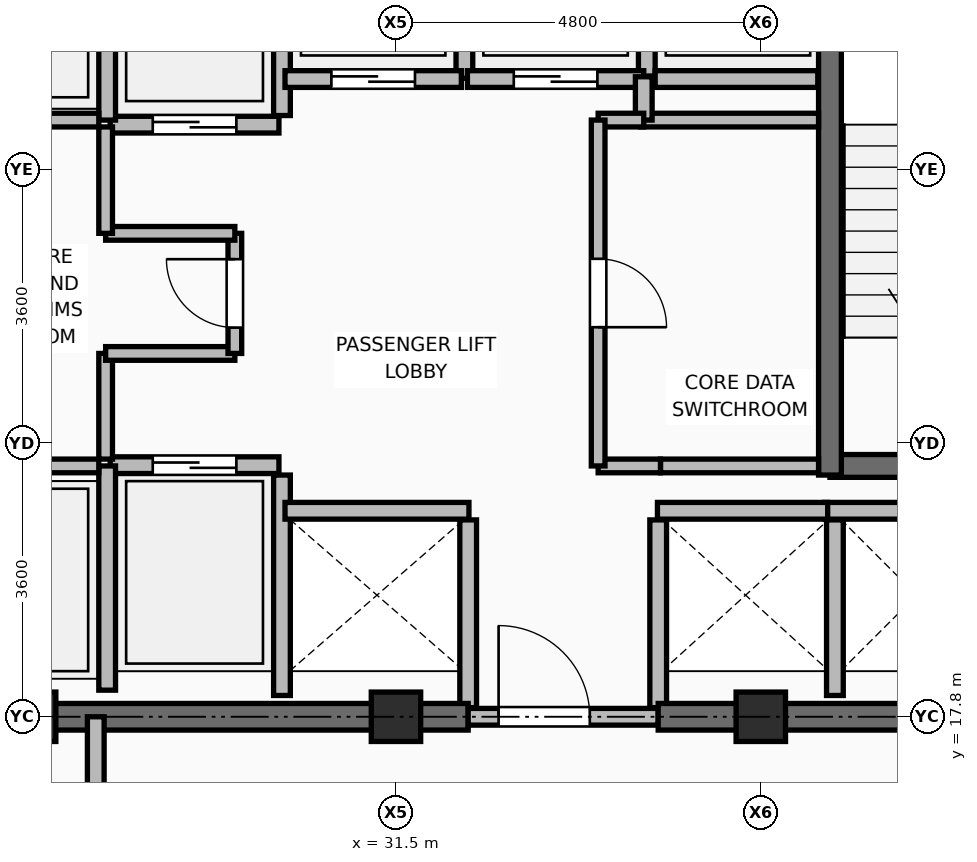
"""IFC4 building model, lengths in metres.
Left out: names, types, materials, properties, quantities, classifications, styles, units other than length and angle.
Written with IfcOpenShell. Run it as: python <this file> out.ifc"""

import sys

from ifc_helpers import new_model, si_unit, direction, frame, frame_2d, origin, origin_2d, place, context, subcontext, project, spatial, rectangle, extrude, element, fill, save


model = new_model("IFC4")
c1 = context("Model", 3, precision=1e-05, world=origin(), true_north=direction((0.0, 1.0)))
c2 = subcontext(c1, "Body", "Model", "MODEL_VIEW")
j1 = project(units=[si_unit("LENGTHUNIT", "METRE"), si_unit("PLANEANGLEUNIT", "RADIAN")], contexts=[c1])
p1 = place(None, origin())
s1 = spatial("IfcSite", under=j1, at=p1, CompositionType="ELEMENT")
p2 = place(p1, origin())
s2 = spatial("IfcBuilding", under=s1, at=p2, CompositionType="ELEMENT")
p3 = place(p2, frame((0.0, 0.0, 271.35)))
s3 = spatial("IfcBuildingStorey", under=s2, at=p3, CompositionType="ELEMENT", Elevation=271.35)
for number, where, z_axis, x_axis in (
    (1, (26.7, 17.8, 0.0), (0.0, 0.0, 1.0), (1.0, 0.0, 0.0)),
    (2, (31.5, 17.8, 0.0), (0.0, 0.0, 1.0), (1.0, 0.0, 0.0)),
    (3, (36.3, 17.8, 0.0), (0.0, 0.0, 1.0), (1.0, 0.0, 0.0)),
):
    element("IfcColumn", number, at=place(p3, frame(where, z_axis=z_axis, x_axis=x_axis)), inside=s3, PredefinedType="COLUMN", context=c2, shape_type="SweptSolid", body=[
        extrude(rectangle(XDim=0.65, YDim=0.65, at=origin_2d()), origin(), (0.0, 0.0, 1.0), 3.75),
    ])
p4 = place(p3, frame((30.0, 18.08, 0.0), z_axis=(0.0, 0.0, 1.0), x_axis=(0.0, 1.0, 0.0)))
e4 = element("IfcWall", 4, at=p4, inside=s3, PredefinedType="PARTITIONING", context=c2, shape_type="SweptSolid", body=[
    extrude(rectangle(XDim=2.9, YDim=0.22, at=frame_2d((1.45, 0.0))), origin(), (0.0, 0.0, 1.0), 3.545),
])
for number, where, z_axis, x_axis in (
    (5, (32.45, 17.92, 0.0), (0.0, 0.0, 1.0), (0.0, 1.0, 0.0)),
    (6, (34.95, 17.92, 0.0), (0.0, 0.0, 1.0), (0.0, 1.0, 0.0)),
):
    element("IfcWall", number, at=place(p3, frame(where, z_axis=z_axis, x_axis=x_axis)), inside=s3, PredefinedType="PARTITIONING", context=c2, shape_type="SweptSolid", body=[
        extrude(rectangle(XDim=2.47, YDim=0.22, at=frame_2d((1.235, 0.0))), origin(), (0.0, 0.0, 1.0), 3.545),
    ])
p5 = place(p3, frame((37.275, 18.08, 0.0), z_axis=(0.0, 0.0, 1.0), x_axis=(0.0, 1.0, 0.0)))
e7 = element("IfcWall", 7, at=p5, inside=s3, PredefinedType="PARTITIONING", context=c2, shape_type="SweptSolid", body=[
    extrude(rectangle(XDim=2.31, YDim=0.22, at=frame_2d((1.155, 0.0))), origin(), (0.0, 0.0, 1.0), 3.545),
])
p6 = place(p3, frame((30.0, 25.71, 0.0), z_axis=(0.0, 0.0, 1.0), x_axis=(0.0, 1.0, 0.0)))
e8 = element("IfcWall", 8, at=p6, inside=s3, PredefinedType="PARTITIONING", context=c2, shape_type="SweptSolid", body=[
    extrude(rectangle(XDim=2.73, YDim=0.22, at=frame_2d((1.365, 0.0))), origin(), (0.0, 0.0, 1.0), 3.545),
])
p7 = place(p3, frame((32.4, 26.2, 0.0), z_axis=(0.0, 0.0, 1.0), x_axis=(0.0, 1.0, 0.0)))
e9 = element("IfcWall", 9, at=p7, inside=s3, PredefinedType="PARTITIONING", context=c2, shape_type="SweptSolid", body=[
    extrude(rectangle(XDim=2.24, YDim=0.22, at=frame_2d((1.12, 0.0))), origin(), (0.0, 0.0, 1.0), 3.545),
])
p8 = place(p3, frame((34.8, 26.23, 0.0), z_axis=(0.0, 0.0, 1.0), x_axis=(0.0, 1.0, 0.0)))
e10 = element("IfcWall", 10, at=p8, inside=s3, PredefinedType="PARTITIONING", context=c2, shape_type="SweptSolid", body=[
    extrude(rectangle(XDim=2.21, YDim=0.22, at=frame_2d((1.105, 0.0))), origin(), (0.0, 0.0, 1.0), 3.545),
])
p9 = place(p3, frame((34.91, 26.19, 0.0), z_axis=(0.0, 0.0, 1.0), x_axis=(1.0, 0.0, 0.0)))
e11 = element("IfcWall", 11, at=p9, inside=s3, PredefinedType="PARTITIONING", context=c2, shape_type="SweptSolid", body=[
    extrude(rectangle(XDim=2.14, YDim=0.22, at=frame_2d((1.07, 0.0))), origin(), (0.0, 0.0, 1.0), 3.545),
])
p10 = place(p3, frame((25.55, 17.8, 0.0), z_axis=(0.0, 0.0, 1.0), x_axis=(1.0, 0.0, 0.0)))
e12 = element("IfcWall", 12, at=p10, inside=s3, PredefinedType="SHEAR", context=c2, shape_type="SweptSolid", body=[
    extrude(rectangle(XDim=6.9, YDim=0.35, at=frame_2d((3.45, 0.0))), origin(), (0.0, 0.0, 1.0), 3.57),
])
p11 = place(p3, frame((32.45, 17.8, 0.0), z_axis=(0.0, 0.0, 1.0), x_axis=(1.0, 0.0, 0.0)))
e13 = element("IfcWall", 13, at=p11, inside=s3, PredefinedType="PARTITIONING", context=c2, shape_type="SweptSolid", body=[
    extrude(rectangle(XDim=2.5, YDim=0.22, at=frame_2d((1.25, 0.0))), origin(), (0.0, 0.0, 1.0), 3.132),
])
p12 = place(p11, frame((0.4, 0.0, 0.0)))
e14 = element("IfcOpeningElement", 14, at=p12, cuts=e13, PredefinedType="OPENING", context=c2, shape_type="SweptSolid", body=[
    extrude(rectangle(XDim=1.2, YDim=2.1, at=frame_2d((0.6, 1.05))), frame((0.0, 0.12, 0.0), z_axis=(0.0, -1.0, 0.0), x_axis=(1.0, 0.0, 0.0)), (0.0, 0.0, 1.0), 0.24),
])
p13 = place(p3, frame((34.95, 17.8, 0.0), z_axis=(0.0, 0.0, 1.0), x_axis=(1.0, 0.0, 0.0)))
e15 = element("IfcWall", 15, at=p13, inside=s3, PredefinedType="SHEAR", context=c2, shape_type="SweptSolid", body=[
    extrude(rectangle(XDim=6.325, YDim=0.35, at=frame_2d((3.163, 0.0))), origin(), (0.0, 0.0, 1.0), 3.57),
])
p14 = place(p3, frame((37.21, 21.1, 0.0), z_axis=(0.0, 0.0, 1.0), x_axis=(1.0, 0.0, 0.0)))
e16 = element("IfcWall", 16, at=p14, inside=s3, PredefinedType="SHEAR", context=c2, shape_type="SweptSolid", body=[
    extrude(rectangle(XDim=3.715, YDim=0.3, at=frame_2d((1.857, 0.0))), origin(), (0.0, 0.0, 1.0), 3.57),
])
p15 = place(p3, frame((37.21, 20.98, 0.0), z_axis=(0.0, 0.0, 1.0), x_axis=(0.0, 1.0, 0.0)))
e17 = element("IfcWall", 17, at=p15, inside=s3, PredefinedType="SHEAR", context=c2, shape_type="SweptSolid", body=[
    extrude(rectangle(XDim=7.99, YDim=0.3, at=frame_2d((3.995, 0.0))), origin(), (0.0, 0.0, 1.0), 3.57),
])
p16 = place(p3, frame((27.74, 21.11, 0.0), z_axis=(0.0, 0.0, 1.0), x_axis=(1.0, 0.0, 0.0)))
e18 = element("IfcWall", 18, at=p16, inside=s3, PredefinedType="PARTITIONING", context=c2, shape_type="SweptSolid", body=[
    extrude(rectangle(XDim=2.22, YDim=0.22, at=frame_2d((1.11, 0.0))), origin(), (0.0, 0.0, 1.0), 3.55),
])
p17 = place(p16, frame((0.56, 0.0, 0.0)))
e19 = element("IfcOpeningElement", 19, at=p17, cuts=e18, PredefinedType="OPENING", context=c2, shape_type="SweptSolid", body=[
    extrude(rectangle(XDim=1.1, YDim=2.2, at=frame_2d((0.55, 1.1))), frame((0.0, 0.12, 0.0), z_axis=(0.0, -1.0, 0.0), x_axis=(1.0, 0.0, 0.0)), (0.0, 0.0, 1.0), 0.24),
])
p18 = place(p3, frame((27.74, 25.59, 0.0), z_axis=(0.0, 0.0, 1.0), x_axis=(1.0, 0.0, 0.0)))
e20 = element("IfcWall", 20, at=p18, inside=s3, PredefinedType="PARTITIONING", context=c2, shape_type="SweptSolid", body=[
    extrude(rectangle(XDim=2.22, YDim=0.22, at=frame_2d((1.11, 0.0))), origin(), (0.0, 0.0, 1.0), 3.55),
])
p19 = place(p18, frame((0.56, 0.0, 0.0)))
e21 = element("IfcOpeningElement", 21, at=p19, cuts=e20, PredefinedType="OPENING", context=c2, shape_type="SweptSolid", body=[
    extrude(rectangle(XDim=1.1, YDim=2.2, at=frame_2d((0.55, 1.1))), frame((0.0, 0.12, 0.0), z_axis=(0.0, -1.0, 0.0), x_axis=(1.0, 0.0, 0.0)), (0.0, 0.0, 1.0), 0.24),
])
p20 = place(p3, frame((30.04, 20.51, 0.0), z_axis=(0.0, 0.0, 1.0), x_axis=(1.0, 0.0, 0.0)))
e22 = element("IfcWall", 22, at=p20, inside=s3, PredefinedType="PARTITIONING", context=c2, shape_type="SweptSolid", body=[
    extrude(rectangle(XDim=2.42, YDim=0.22, at=frame_2d((1.21, 0.0))), origin(), (0.0, 0.0, 1.0), 3.55),
])
for number, where, z_axis, x_axis in (
    (23, (37.14, 20.51, 0.0), (0.0, 0.0, 1.0), (1.0, 0.0, 0.0)),
    (24, (34.94, 20.51, 0.0), (0.0, 0.0, 1.0), (1.0, 0.0, 0.0)),
):
    element("IfcWall", number, at=place(p3, frame(where, z_axis=z_axis, x_axis=x_axis)), inside=s3, PredefinedType="PARTITIONING", context=c2, shape_type="SweptSolid", body=[
        extrude(rectangle(XDim=2.24, YDim=0.22, at=frame_2d((1.12, 0.0))), origin(), (0.0, 0.0, 1.0), 3.55),
    ])
p21 = place(p3, frame((30.04, 26.19, 0.0), z_axis=(0.0, 0.0, 1.0), x_axis=(1.0, 0.0, 0.0)))
e25 = element("IfcWall", 25, at=p21, inside=s3, PredefinedType="PARTITIONING", context=c2, shape_type="SweptSolid", body=[
    extrude(rectangle(XDim=2.32, YDim=0.22, at=frame_2d((1.16, 0.0))), origin(), (0.0, 0.0, 1.0), 3.55),
])
p22 = place(p21, frame((0.61, 0.0, 0.0)))
e26 = element("IfcOpeningElement", 26, at=p22, cuts=e25, PredefinedType="OPENING", context=c2, shape_type="SweptSolid", body=[
    extrude(rectangle(XDim=1.1, YDim=2.2, at=frame_2d((0.55, 1.1))), frame((0.0, 0.12, 0.0), z_axis=(0.0, -1.0, 0.0), x_axis=(1.0, 0.0, 0.0)), (0.0, 0.0, 1.0), 0.24),
])
p23 = place(p3, frame((32.44, 26.19, 0.0), z_axis=(0.0, 0.0, 1.0), x_axis=(1.0, 0.0, 0.0)))
e27 = element("IfcWall", 27, at=p23, inside=s3, PredefinedType="PARTITIONING", context=c2, shape_type="SweptSolid", body=[
    extrude(rectangle(XDim=2.32, YDim=0.22, at=frame_2d((1.16, 0.0))), origin(), (0.0, 0.0, 1.0), 3.55),
])
p24 = place(p23, frame((0.61, 0.0, 0.0)))
e28 = element("IfcOpeningElement", 28, at=p24, cuts=e27, PredefinedType="OPENING", context=c2, shape_type="SweptSolid", body=[
    extrude(rectangle(XDim=1.1, YDim=2.2, at=frame_2d((0.55, 1.1))), frame((0.0, 0.12, 0.0), z_axis=(0.0, -1.0, 0.0), x_axis=(1.0, 0.0, 0.0)), (0.0, 0.0, 1.0), 0.24),
])
p25 = place(p3, frame((27.7, 18.15, 0.0), z_axis=(0.0, 0.0, 1.0), x_axis=(0.0, 1.0, 0.0)))
e29 = element("IfcWall", 29, at=p25, inside=s3, PredefinedType="PARTITIONING", context=c2, shape_type="SweptSolid", body=[
    extrude(rectangle(XDim=2.95, YDim=0.22, at=frame_2d((1.475, 0.0))), origin(), (0.0, 0.0, 1.0), 3.55),
])
p26 = place(p3, frame((27.7, 25.65, 0.0), z_axis=(0.0, 0.0, 1.0), x_axis=(0.0, 1.0, 0.0)))
e30 = element("IfcWall", 30, at=p26, inside=s3, PredefinedType="PARTITIONING", context=c2, shape_type="SweptSolid", body=[
    extrude(rectangle(XDim=3.0, YDim=0.22, at=frame_2d((1.5, 0.0))), origin(), (0.0, 0.0, 1.0), 3.55),
])
for number, where, z_axis, x_axis in (
    (31, (25.89, 21.1, 0.0), (0.0, 0.0, 1.0), (1.0, 0.0, 0.0)),
    (32, (25.89, 25.65, 0.0), (0.0, 0.0, 1.0), (1.0, 0.0, 0.0)),
):
    element("IfcWall", number, at=place(p3, frame(where, z_axis=z_axis, x_axis=x_axis)), inside=s3, PredefinedType="PARTITIONING", context=c2, shape_type="SweptSolid", body=[
        extrude(rectangle(XDim=1.7, YDim=0.18, at=frame_2d((0.85, 0.0))), origin(), (0.0, 0.0, 1.0), 3.55),
    ])
p27 = place(p3, frame((27.68, 21.19, 0.0), z_axis=(0.0, 0.0, 1.0), x_axis=(0.0, 1.0, 0.0)))
e33 = element("IfcWall", 33, at=p27, inside=s3, PredefinedType="PARTITIONING", context=c2, shape_type="SweptSolid", body=[
    extrude(rectangle(XDim=1.39, YDim=0.18, at=frame_2d((0.695, 0.0))), origin(), (0.0, 0.0, 1.0), 3.55),
])
p28 = place(p3, frame((27.68, 22.58, 0.0), z_axis=(0.0, 0.0, 1.0), x_axis=(1.0, 0.0, 0.0)))
e34 = element("IfcWall", 34, at=p28, inside=s3, PredefinedType="PARTITIONING", context=c2, shape_type="SweptSolid", body=[
    extrude(rectangle(XDim=1.7, YDim=0.18, at=frame_2d((0.85, 0.0))), origin(), (0.0, 0.0, 1.0), 3.55),
])
p29 = place(p3, frame((29.38, 22.58, 0.0), z_axis=(0.0, 0.0, 1.0), x_axis=(0.0, 1.0, 0.0)))
e35 = element("IfcWall", 35, at=p29, inside=s3, PredefinedType="PARTITIONING", context=c2, shape_type="SweptSolid", body=[
    extrude(rectangle(XDim=1.58, YDim=0.18, at=frame_2d((0.79, 0.0))), origin(), (0.0, 0.0, 1.0), 3.55),
])
p30 = place(p29, frame((0.34, 0.0, 0.0)))
e36 = element("IfcOpeningElement", 36, at=p30, cuts=e35, PredefinedType="OPENING", context=c2, shape_type="SweptSolid", body=[
    extrude(rectangle(XDim=0.9, YDim=2.1, at=frame_2d((0.45, 1.05))), frame((0.0, 0.1, 0.0), z_axis=(0.0, -1.0, 0.0), x_axis=(1.0, 0.0, 0.0)), (0.0, 0.0, 1.0), 0.2),
])
p31 = place(p3, frame((27.68, 24.16, 0.0), z_axis=(0.0, 0.0, 1.0), x_axis=(1.0, 0.0, 0.0)))
e37 = element("IfcWall", 37, at=p31, inside=s3, PredefinedType="PARTITIONING", context=c2, shape_type="SweptSolid", body=[
    extrude(rectangle(XDim=1.7, YDim=0.18, at=frame_2d((0.85, 0.0))), origin(), (0.0, 0.0, 1.0), 3.55),
])
p32 = place(p3, frame((27.68, 24.16, 0.0), z_axis=(0.0, 0.0, 1.0), x_axis=(0.0, 1.0, 0.0)))
e38 = element("IfcWall", 38, at=p32, inside=s3, PredefinedType="PARTITIONING", context=c2, shape_type="SweptSolid", body=[
    extrude(rectangle(XDim=1.4, YDim=0.18, at=frame_2d((0.7, 0.0))), origin(), (0.0, 0.0, 1.0), 3.55),
])
p33 = place(p3, frame((34.98, 21.1, 0.0), z_axis=(0.0, 0.0, 1.0), x_axis=(1.0, 0.0, 0.0)))
e39 = element("IfcWall", 39, at=p33, inside=s3, PredefinedType="PARTITIONING", context=c2, shape_type="SweptSolid", body=[
    extrude(rectangle(XDim=2.08, YDim=0.18, at=frame_2d((1.04, 0.0))), origin(), (0.0, 0.0, 1.0), 3.55),
])
p34 = place(p3, frame((34.72, 25.65, 0.0), z_axis=(0.0, 0.0, 1.0), x_axis=(1.0, 0.0, 0.0)))
e40 = element("IfcWall", 40, at=p34, inside=s3, PredefinedType="PARTITIONING", context=c2, shape_type="SweptSolid", body=[
    extrude(rectangle(XDim=2.34, YDim=0.18, at=frame_2d((1.17, 0.0))), origin(), (0.0, 0.0, 1.0), 3.55),
])
p35 = place(p3, frame((34.76, 25.65, 0.0), z_axis=(0.0, 0.0, 1.0), x_axis=(0.0, 1.0, 0.0)))
e41 = element("IfcWall", 41, at=p35, inside=s3, PredefinedType="PARTITIONING", context=c2, shape_type="SweptSolid", body=[
    extrude(rectangle(XDim=0.57, YDim=0.22, at=frame_2d((0.285, 0.0))), origin(), (0.0, 0.0, 1.0), 3.55),
])
p36 = place(p3, frame((34.16, 21.1, 0.0), z_axis=(0.0, 0.0, 1.0), x_axis=(1.0, 0.0, 0.0)))
e42 = element("IfcWall", 42, at=p36, inside=s3, PredefinedType="PARTITIONING", context=c2, shape_type="SweptSolid", body=[
    extrude(rectangle(XDim=0.82, YDim=0.18, at=frame_2d((0.41, 0.0))), origin(), (0.0, 0.0, 1.0), 3.55),
])
p37 = place(p3, frame((34.16, 25.65, 0.0), z_axis=(0.0, 0.0, 1.0), x_axis=(1.0, 0.0, 0.0)))
e43 = element("IfcWall", 43, at=p37, inside=s3, PredefinedType="PARTITIONING", context=c2, shape_type="SweptSolid", body=[
    extrude(rectangle(XDim=0.6, YDim=0.18, at=frame_2d((0.3, 0.0))), origin(), (0.0, 0.0, 1.0), 3.55),
])
p38 = place(p3, frame((34.16, 21.1, 0.0), z_axis=(0.0, 0.0, 1.0), x_axis=(0.0, 1.0, 0.0)))
e44 = element("IfcWall", 44, at=p38, inside=s3, PredefinedType="PARTITIONING", context=c2, shape_type="SweptSolid", body=[
    extrude(rectangle(XDim=4.55, YDim=0.18, at=frame_2d((2.275, 0.0))), origin(), (0.0, 0.0, 1.0), 3.55),
])
p39 = place(p38, frame((1.825, 0.0, 0.0)))
e45 = element("IfcOpeningElement", 45, at=p39, cuts=e44, PredefinedType="OPENING", context=c2, shape_type="SweptSolid", body=[
    extrude(rectangle(XDim=0.9, YDim=2.1, at=frame_2d((0.45, 1.05))), frame((0.0, 0.1, 0.0), z_axis=(0.0, -1.0, 0.0), x_axis=(1.0, 0.0, 0.0)), (0.0, 0.0, 1.0), 0.2),
])
p40 = place(p3, frame((27.55, 14.35, 0.0), z_axis=(0.0, 0.0, 1.0), x_axis=(0.0, 1.0, 0.0)))
e46 = element("IfcWall", 46, at=p40, inside=s3, PredefinedType="PARTITIONING", context=c2, shape_type="SweptSolid", body=[
    extrude(rectangle(XDim=3.45, YDim=0.22, at=frame_2d((1.725, 0.0))), origin(), (0.0, 0.0, 1.0), 3.132),
])
p41 = place(p40, frame((1.175, 0.0, 0.0)))
e47 = element("IfcOpeningElement", 47, at=p41, cuts=e46, PredefinedType="OPENING", context=c2, shape_type="SweptSolid", body=[
    extrude(rectangle(XDim=1.1, YDim=2.1, at=frame_2d((0.55, 1.05))), frame((0.0, 0.12, 0.0), z_axis=(0.0, -1.0, 0.0), x_axis=(1.0, 0.0, 0.0)), (0.0, 0.0, 1.0), 0.24),
])
p42 = place(p12, origin())
e48 = element("IfcDoor", 48, at=p42, inside=s3, OperationType="SINGLE_SWING_LEFT", PredefinedType="DOOR", context=c2, shape_type="SweptSolid", body=[
    extrude(rectangle(XDim=1.2, YDim=2.1, at=frame_2d((0.6, 1.05))), frame((0.0, 0.025, 0.0), z_axis=(0.0, -1.0, 0.0), x_axis=(1.0, 0.0, 0.0)), (0.0, 0.0, 1.0), 0.05),
])
fill(e14, e48)
p43 = place(p17, origin())
e49 = element("IfcDoor", 49, at=p43, inside=s3, OperationType="DOUBLE_DOOR_SLIDING", PredefinedType="DOOR", context=c2, shape_type="SweptSolid", body=[
    extrude(rectangle(XDim=1.1, YDim=2.2, at=frame_2d((0.55, 1.1))), frame((0.0, 0.025, 0.0), z_axis=(0.0, -1.0, 0.0), x_axis=(1.0, 0.0, 0.0)), (0.0, 0.0, 1.0), 0.05),
])
fill(e19, e49)
p44 = place(p19, frame((1.1, 0.0, 0.0), z_axis=(0.0, 0.0, 1.0), x_axis=(-1.0, 0.0, 0.0)))
e50 = element("IfcDoor", 50, at=p44, inside=s3, OperationType="DOUBLE_DOOR_SLIDING", PredefinedType="DOOR", context=c2, shape_type="SweptSolid", body=[
    extrude(rectangle(XDim=1.1, YDim=2.2, at=frame_2d((0.55, 1.1))), frame((0.0, 0.025, 0.0), z_axis=(0.0, -1.0, 0.0), x_axis=(1.0, 0.0, 0.0)), (0.0, 0.0, 1.0), 0.05),
])
fill(e21, e50)
p45 = place(p22, frame((1.1, 0.0, 0.0), z_axis=(0.0, 0.0, 1.0), x_axis=(-1.0, 0.0, 0.0)))
e51 = element("IfcDoor", 51, at=p45, inside=s3, OperationType="DOUBLE_DOOR_SLIDING", PredefinedType="DOOR", context=c2, shape_type="SweptSolid", body=[
    extrude(rectangle(XDim=1.1, YDim=2.2, at=frame_2d((0.55, 1.1))), frame((0.0, 0.025, 0.0), z_axis=(0.0, -1.0, 0.0), x_axis=(1.0, 0.0, 0.0)), (0.0, 0.0, 1.0), 0.05),
])
fill(e26, e51)
p46 = place(p24, frame((1.1, 0.0, 0.0), z_axis=(0.0, 0.0, 1.0), x_axis=(-1.0, 0.0, 0.0)))
e52 = element("IfcDoor", 52, at=p46, inside=s3, OperationType="DOUBLE_DOOR_SLIDING", PredefinedType="DOOR", context=c2, shape_type="SweptSolid", body=[
    extrude(rectangle(XDim=1.1, YDim=2.2, at=frame_2d((0.55, 1.1))), frame((0.0, 0.025, 0.0), z_axis=(0.0, -1.0, 0.0), x_axis=(1.0, 0.0, 0.0)), (0.0, 0.0, 1.0), 0.05),
])
fill(e28, e52)
p47 = place(p30, origin())
e53 = element("IfcDoor", 53, at=p47, inside=s3, OperationType="SINGLE_SWING_RIGHT", PredefinedType="DOOR", context=c2, shape_type="SweptSolid", body=[
    extrude(rectangle(XDim=0.9, YDim=2.1, at=frame_2d((0.45, 1.05))), frame((0.0, 0.025, 0.0), z_axis=(0.0, -1.0, 0.0), x_axis=(1.0, 0.0, 0.0)), (0.0, 0.0, 1.0), 0.05),
])
fill(e36, e53)
p48 = place(p39, frame((0.9, 0.0, 0.0), z_axis=(0.0, 0.0, 1.0), x_axis=(-1.0, 0.0, 0.0)))
e54 = element("IfcDoor", 54, at=p48, inside=s3, OperationType="SINGLE_SWING_RIGHT", PredefinedType="DOOR", context=c2, shape_type="SweptSolid", body=[
    extrude(rectangle(XDim=0.9, YDim=2.1, at=frame_2d((0.45, 1.05))), frame((0.0, 0.025, 0.0), z_axis=(0.0, -1.0, 0.0), x_axis=(1.0, 0.0, 0.0)), (0.0, 0.0, 1.0), 0.05),
])
fill(e45, e54)
save(model, sys.argv[1])
